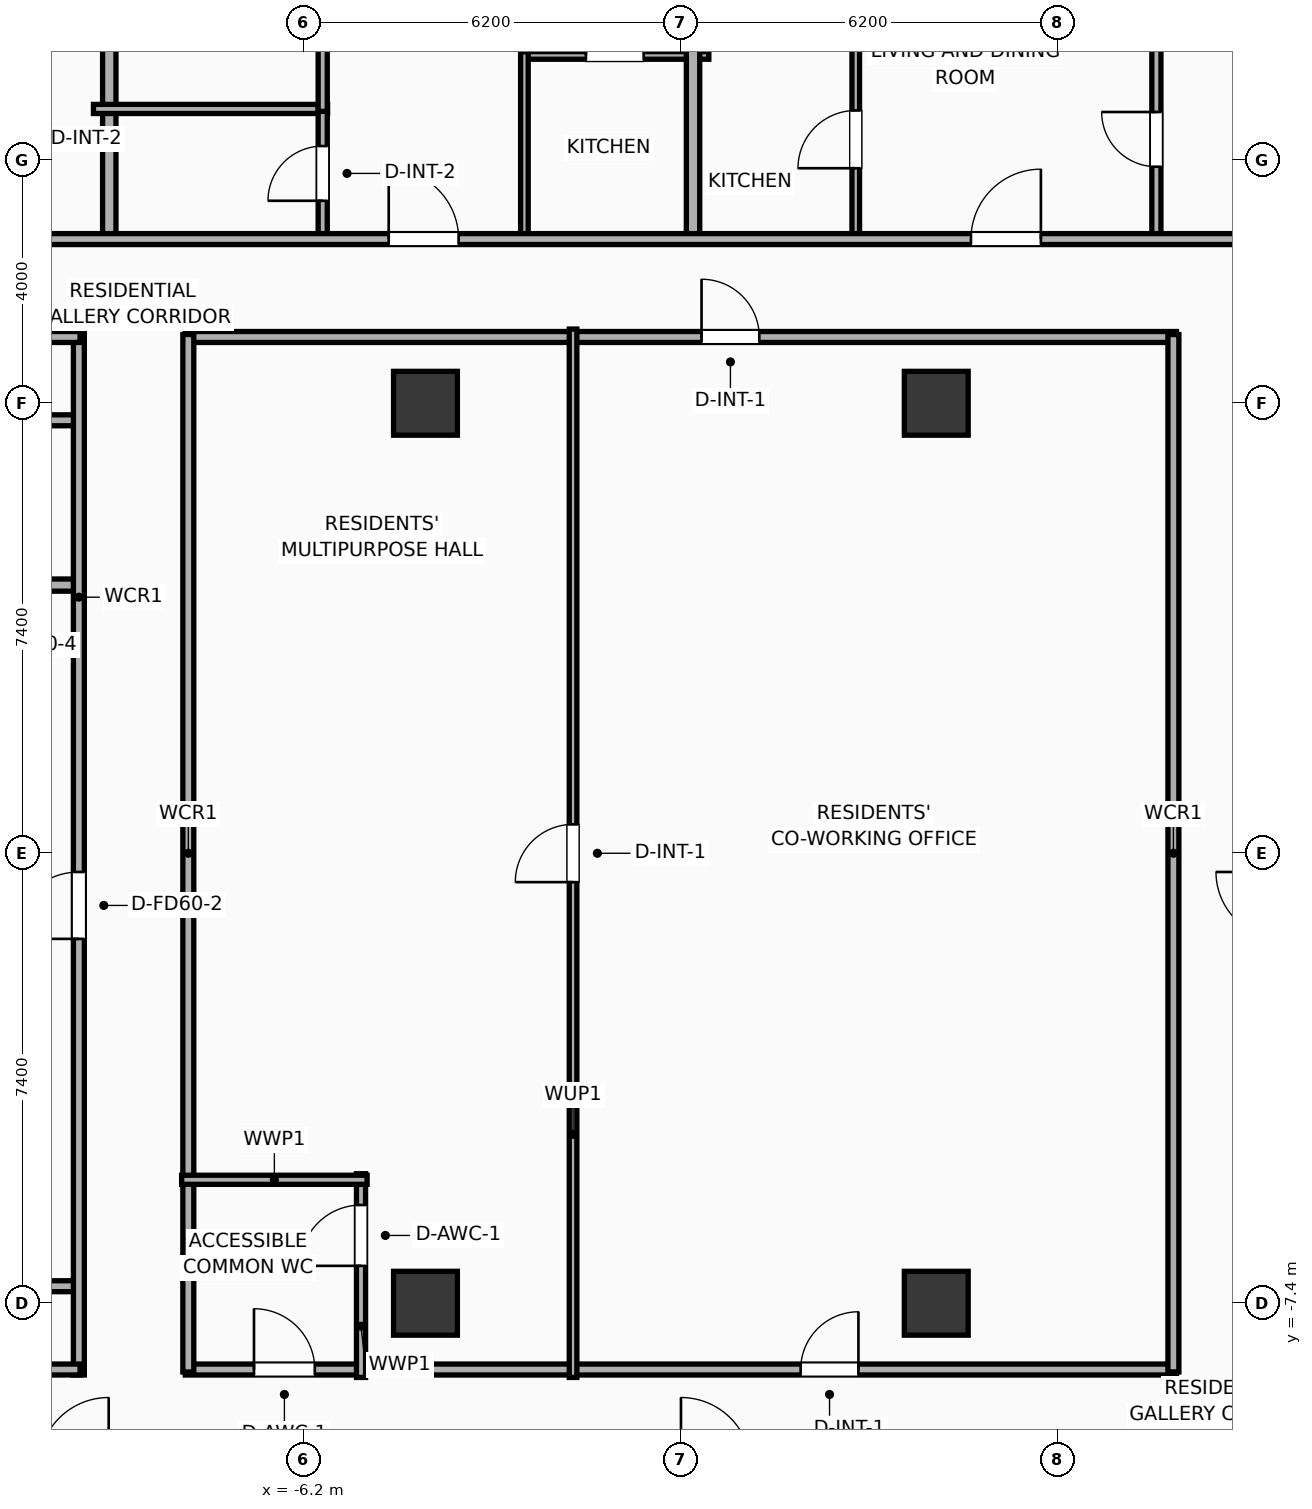
"""IFC4 building model, lengths in metres.
Left out: names, types, materials, properties, quantities, classifications, styles, units other than length and angle.
Written with IfcOpenShell. Run it as: python <this file> out.ifc"""

import sys

from ifc_helpers import new_model, si_unit, direction, frame, frame_2d, origin, origin_2d, place, context, subcontext, project, spatial, rectangle, extrude, element, fill, save


model = new_model("IFC4")
c1 = context("Model", 3, precision=1e-05, world=origin(), true_north=direction((0.0, 1.0)))
c2 = subcontext(c1, "Body", "Model", "MODEL_VIEW")
j1 = project(units=[si_unit("LENGTHUNIT", "METRE"), si_unit("PLANEANGLEUNIT", "RADIAN")], contexts=[c1])
p1 = place(None, origin())
s1 = spatial("IfcSite", under=j1, at=p1, CompositionType="ELEMENT")
p2 = place(p1, origin())
s2 = spatial("IfcBuilding", under=s1, at=p2, CompositionType="ELEMENT")
p3 = place(p2, frame((0.0, 0.0, 97.5)))
s3 = spatial("IfcBuildingStorey", under=s2, at=p3, CompositionType="ELEMENT", Elevation=97.5)
for number, where, z_axis, x_axis in (
    (1, (-4.2, -7.4, 0.0), (0.0, 0.0, 1.0), (1.0, 0.0, 0.0)),
    (2, (-4.2, 7.4, 0.0), (0.0, 0.0, 1.0), (1.0, 0.0, 0.0)),
    (3, (4.2, -7.4, 0.0), (0.0, 0.0, 1.0), (1.0, 0.0, 0.0)),
    (4, (4.2, 7.4, 0.0), (0.0, 0.0, 1.0), (1.0, 0.0, 0.0)),
):
    element("IfcColumn", number, at=place(p3, frame(where, z_axis=z_axis, x_axis=x_axis)), inside=s3, PredefinedType="COLUMN", context=c2, shape_type="SweptSolid", body=[
        extrude(rectangle(XDim=1.05, YDim=1.05, at=origin_2d()), origin(), (0.0, 0.0, 1.0), 3.9),
    ])
p4 = place(p3, frame((-12.15, 4.41, 0.0), z_axis=(0.0, 0.0, 1.0), x_axis=(1.0, 0.0, 0.0)))
e5 = element("IfcWall", 5, at=p4, inside=s3, PredefinedType="PARTITIONING", context=c2, shape_type="SweptSolid", body=[
    extrude(rectangle(XDim=2.27, YDim=0.2, at=frame_2d((1.135, 0.0))), origin(), (0.0, 0.0, 1.0), 3.65),
])
p5 = place(p4, frame((0.685, 0.0, 0.0)))
e6 = element("IfcOpeningElement", 6, at=p5, cuts=e5, PredefinedType="OPENING", context=c2, shape_type="SweptSolid", body=[
    extrude(rectangle(XDim=0.9, YDim=2.05, at=frame_2d((0.45, 1.025))), frame((0.0, 0.11, 0.0), z_axis=(0.0, -1.0, 0.0), x_axis=(1.0, 0.0, 0.0)), (0.0, 0.0, 1.0), 0.22),
])
for number, where, z_axis, x_axis in (
    (7, (-12.15, 7.12, 0.0), (0.0, 0.0, 1.0), (1.0, 0.0, 0.0)),
    (8, (-12.15, -7.12, 0.0), (0.0, 0.0, 1.0), (1.0, 0.0, 0.0)),
):
    element("IfcWall", number, at=place(p3, frame(where, z_axis=z_axis, x_axis=x_axis)), inside=s3, PredefinedType="PARTITIONING", context=c2, shape_type="SweptSolid", body=[
        extrude(rectangle(XDim=2.27, YDim=0.18, at=frame_2d((1.135, 0.0))), origin(), (0.0, 0.0, 1.0), 3.65),
    ])
p6 = place(p3, frame((-9.9, -8.58, 0.0), z_axis=(0.0, 0.0, 1.0), x_axis=(0.0, 1.0, 0.0)))
e9 = element("IfcWall", 9, at=p6, inside=s3, PredefinedType="PARTITIONING", context=c2, shape_type="SweptSolid", body=[
    extrude(rectangle(XDim=17.16, YDim=0.18, at=frame_2d((8.58, 0.0))), origin(), (0.0, 0.0, 1.0), 3.65),
])
p7 = place(p6, frame((7.172, 0.0, 0.0)))
e10 = element("IfcOpeningElement", 10, at=p7, cuts=e9, PredefinedType="OPENING", context=c2, shape_type="SweptSolid", body=[
    extrude(rectangle(XDim=1.1, YDim=2.05, at=frame_2d((0.55, 1.025))), frame((0.0, 0.1, 0.0), z_axis=(0.0, -1.0, 0.0), x_axis=(1.0, 0.0, 0.0)), (0.0, 0.0, 1.0), 0.2),
])
p8 = place(p3, frame((-29.21, 8.49, 0.0), z_axis=(0.0, 0.0, 1.0), x_axis=(1.0, 0.0, 0.0)))
e11 = element("IfcWall", 11, at=p8, inside=s3, PredefinedType="PARTITIONING", context=c2, shape_type="SweptSolid", body=[
    extrude(rectangle(XDim=19.33, YDim=0.18, at=frame_2d((9.665, 0.0))), origin(), (0.0, 0.0, 1.0), 3.65),
])
p9 = place(p8, frame((2.065, 0.0, 0.0)))
e12 = element("IfcOpeningElement", 12, at=p9, cuts=e11, PredefinedType="OPENING", context=c2, shape_type="SweptSolid", body=[
    extrude(rectangle(XDim=1.15, YDim=2.05, at=frame_2d((0.575, 1.025))), frame((0.0, 0.1, 0.0), z_axis=(0.0, -1.0, 0.0), x_axis=(1.0, 0.0, 0.0)), (0.0, 0.0, 1.0), 0.2),
])
p10 = place(p3, frame((-29.21, -8.49, 0.0), z_axis=(0.0, 0.0, 1.0), x_axis=(1.0, 0.0, 0.0)))
e13 = element("IfcWall", 13, at=p10, inside=s3, PredefinedType="PARTITIONING", context=c2, shape_type="SweptSolid", body=[
    extrude(rectangle(XDim=19.33, YDim=0.18, at=frame_2d((9.665, 0.0))), origin(), (0.0, 0.0, 1.0), 3.65),
])
p11 = place(p3, frame((-8.15, 8.49, 0.0), z_axis=(0.0, 0.0, 1.0), x_axis=(1.0, 0.0, 0.0)))
e14 = element("IfcWall", 14, at=p11, inside=s3, PredefinedType="PARTITIONING", context=c2, shape_type="SweptSolid", body=[
    extrude(rectangle(XDim=16.3, YDim=0.18, at=frame_2d((8.15, 0.0))), origin(), (0.0, 0.0, 1.0), 3.65),
])
p12 = place(p11, frame((8.49, 0.0, 0.0)))
e15 = element("IfcOpeningElement", 15, at=p12, cuts=e14, PredefinedType="OPENING", context=c2, shape_type="SweptSolid", body=[
    extrude(rectangle(XDim=0.95, YDim=2.05, at=frame_2d((0.475, 1.025))), frame((0.0, 0.1, 0.0), z_axis=(0.0, -1.0, 0.0), x_axis=(1.0, 0.0, 0.0)), (0.0, 0.0, 1.0), 0.2),
])
p13 = place(p3, frame((-8.15, -8.49, 0.0), z_axis=(0.0, 0.0, 1.0), x_axis=(1.0, 0.0, 0.0)))
e16 = element("IfcWall", 16, at=p13, inside=s3, PredefinedType="PARTITIONING", context=c2, shape_type="SweptSolid", body=[
    extrude(rectangle(XDim=16.3, YDim=0.18, at=frame_2d((8.15, 0.0))), origin(), (0.0, 0.0, 1.0), 3.65),
])
p14 = place(p13, frame((1.13, 0.0, 0.0)))
e17 = element("IfcOpeningElement", 17, at=p14, cuts=e16, PredefinedType="OPENING", context=c2, shape_type="SweptSolid", body=[
    extrude(rectangle(XDim=1.0, YDim=2.05, at=frame_2d((0.5, 1.025))), frame((0.0, 0.1, 0.0), z_axis=(0.0, -1.0, 0.0), x_axis=(1.0, 0.0, 0.0)), (0.0, 0.0, 1.0), 0.2),
])
p15 = place(p13, frame((10.12, 0.0, 0.0)))
e18 = element("IfcOpeningElement", 18, at=p15, cuts=e16, PredefinedType="OPENING", context=c2, shape_type="SweptSolid", body=[
    extrude(rectangle(XDim=0.95, YDim=2.05, at=frame_2d((0.475, 1.025))), frame((0.0, 0.1, 0.0), z_axis=(0.0, -1.0, 0.0), x_axis=(1.0, 0.0, 0.0)), (0.0, 0.0, 1.0), 0.2),
])
for number, where, z_axis, x_axis in (
    (19, (-8.1, -8.53, 0.0), (0.0, 0.0, 1.0), (0.0, 1.0, 0.0)),
    (20, (8.1, -8.53, 0.0), (0.0, 0.0, 1.0), (0.0, 1.0, 0.0)),
):
    element("IfcWall", number, at=place(p3, frame(where, z_axis=z_axis, x_axis=x_axis)), inside=s3, PredefinedType="PARTITIONING", context=c2, shape_type="SweptSolid", body=[
        extrude(rectangle(XDim=17.06, YDim=0.18, at=frame_2d((8.53, 0.0))), origin(), (0.0, 0.0, 1.0), 3.65),
    ])
p16 = place(p3, frame((-5.26, -8.62, 0.0), z_axis=(0.0, 0.0, 1.0), x_axis=(0.0, 1.0, 0.0)))
e21 = element("IfcWall", 21, at=p16, inside=s3, PredefinedType="PLUMBINGWALL", context=c2, shape_type="SweptSolid", body=[
    extrude(rectangle(XDim=3.35, YDim=0.15, at=frame_2d((1.675, 0.0))), origin(), (0.0, 0.0, 1.0), 3.65),
])
p17 = place(p16, frame((1.835, 0.0, 0.0)))
e22 = element("IfcOpeningElement", 22, at=p17, cuts=e21, PredefinedType="OPENING", context=c2, shape_type="SweptSolid", body=[
    extrude(rectangle(XDim=1.0, YDim=2.05, at=frame_2d((0.5, 1.025))), frame((0.0, 0.085, 0.0), z_axis=(0.0, -1.0, 0.0), x_axis=(1.0, 0.0, 0.0)), (0.0, 0.0, 1.0), 0.17),
])
p18 = place(p3, frame((-8.21, -5.37, 0.0), z_axis=(0.0, 0.0, 1.0), x_axis=(1.0, 0.0, 0.0)))
e23 = element("IfcWall", 23, at=p18, inside=s3, PredefinedType="PLUMBINGWALL", context=c2, shape_type="SweptSolid", body=[
    extrude(rectangle(XDim=3.05, YDim=0.15, at=frame_2d((1.525, 0.0))), origin(), (0.0, 0.0, 1.0), 3.65),
])
p19 = place(p3, frame((-1.773, -8.62, 0.0), z_axis=(0.0, 0.0, 1.0), x_axis=(0.0, 1.0, 0.0)))
e24 = element("IfcWall", 24, at=p19, inside=s3, PredefinedType="PARTITIONING", context=c2, shape_type="SweptSolid", body=[
    extrude(rectangle(XDim=17.24, YDim=0.125, at=frame_2d((8.62, 0.0))), origin(), (0.0, 0.0, 1.0), 3.65),
])
p20 = place(p19, frame((8.145, 0.0, 0.0)))
e25 = element("IfcOpeningElement", 25, at=p20, cuts=e24, PredefinedType="OPENING", context=c2, shape_type="SweptSolid", body=[
    extrude(rectangle(XDim=0.95, YDim=2.05, at=frame_2d((0.475, 1.025))), frame((0.0, 0.073, 0.0), z_axis=(0.0, -1.0, 0.0), x_axis=(1.0, 0.0, 0.0)), (0.0, 0.0, 1.0), 0.145),
])
p21 = place(p3, frame((-9.4, 10.02, 0.0), z_axis=(0.0, 0.0, 1.0), x_axis=(0.0, 1.0, 0.0)))
e26 = element("IfcWall", 26, at=p21, inside=s3, PredefinedType="PARTITIONING", context=c2, shape_type="SweptSolid", body=[
    extrude(rectangle(XDim=11.59, YDim=0.22, at=frame_2d((5.795, 0.0))), origin(), (0.0, 0.0, 1.0), 3.65),
])
p22 = place(p3, frame((-9.66, 12.24, 0.0), z_axis=(0.0, 0.0, 1.0), x_axis=(1.0, 0.0, 0.0)))
e27 = element("IfcWall", 27, at=p22, inside=s3, PredefinedType="PLUMBINGWALL", context=c2, shape_type="SweptSolid", body=[
    extrude(rectangle(XDim=3.85, YDim=0.15, at=frame_2d((1.925, 0.0))), origin(), (0.0, 0.0, 1.0), 3.65),
])
p23 = place(p3, frame((-5.89, 10.08, 0.0), z_axis=(0.0, 0.0, 1.0), x_axis=(0.0, 1.0, 0.0)))
e28 = element("IfcWall", 28, at=p23, inside=s3, PredefinedType="PLUMBINGWALL", context=c2, shape_type="SweptSolid", body=[
    extrude(rectangle(XDim=2.2, YDim=0.15, at=frame_2d((1.1, 0.0))), origin(), (0.0, 0.0, 1.0), 3.65),
])
p24 = place(p23, frame((0.65, 0.0, 0.0)))
e29 = element("IfcOpeningElement", 29, at=p24, cuts=e28, PredefinedType="OPENING", context=c2, shape_type="SweptSolid", body=[
    extrude(rectangle(XDim=0.9, YDim=2.05, at=frame_2d((0.45, 1.025))), frame((0.0, 0.085, 0.0), z_axis=(0.0, -1.0, 0.0), x_axis=(1.0, 0.0, 0.0)), (0.0, 0.0, 1.0), 0.17),
])
p25 = place(p3, frame((-5.89, 12.2, 0.0), z_axis=(0.0, 0.0, 1.0), x_axis=(0.0, 1.0, 0.0)))
e30 = element("IfcWall", 30, at=p25, inside=s3, PredefinedType="PLUMBINGWALL", context=c2, shape_type="SweptSolid", body=[
    extrude(rectangle(XDim=9.458, YDim=0.15, at=frame_2d((4.729, 0.0))), origin(), (0.0, 0.0, 1.0), 3.65),
])
p26 = place(p25, frame((1.063, 0.0, 0.0)))
e31 = element("IfcOpeningElement", 31, at=p26, cuts=e30, PredefinedType="OPENING", context=c2, shape_type="SweptSolid", body=[
    extrude(rectangle(XDim=0.9, YDim=2.05, at=frame_2d((0.45, 1.025))), frame((0.0, 0.085, 0.0), z_axis=(0.0, -1.0, 0.0), x_axis=(1.0, 0.0, 0.0)), (0.0, 0.0, 1.0), 0.17),
])
p27 = place(p3, frame((-2.633, 13.12, 0.0), z_axis=(0.0, 0.0, 1.0), x_axis=(1.0, 0.0, 0.0)))
e32 = element("IfcWall", 32, at=p27, inside=s3, PredefinedType="PARTITIONING", context=c2, shape_type="SweptSolid", body=[
    extrude(rectangle(XDim=3.093, YDim=0.125, at=frame_2d((1.546, 0.0))), origin(), (0.0, 0.0, 1.0), 3.65),
])
p28 = place(p27, frame((1.072, 0.0, 0.0)))
e33 = element("IfcOpeningElement", 33, at=p28, cuts=e32, PredefinedType="OPENING", context=c2, shape_type="SweptSolid", body=[
    extrude(rectangle(XDim=0.95, YDim=2.05, at=frame_2d((0.475, 1.025))), frame((0.0, 0.073, 0.0), z_axis=(0.0, -1.0, 0.0), x_axis=(1.0, 0.0, 0.0)), (0.0, 0.0, 1.0), 0.145),
])
p29 = place(p3, frame((-2.573, 10.08, 0.0), z_axis=(0.0, 0.0, 1.0), x_axis=(0.0, 1.0, 0.0)))
e34 = element("IfcWall", 34, at=p29, inside=s3, PredefinedType="PARTITIONING", context=c2, shape_type="SweptSolid", body=[
    extrude(rectangle(XDim=3.1, YDim=0.125, at=frame_2d((1.55, 0.0))), origin(), (0.0, 0.0, 1.0), 3.65),
])
p30 = place(p3, frame((0.2, 10.02, 0.0), z_axis=(0.0, 0.0, 1.0), x_axis=(0.0, 1.0, 0.0)))
e35 = element("IfcWall", 35, at=p30, inside=s3, PredefinedType="PARTITIONING", context=c2, shape_type="SweptSolid", body=[
    extrude(rectangle(XDim=11.59, YDim=0.22, at=frame_2d((5.795, 0.0))), origin(), (0.0, 0.0, 1.0), 3.65),
])
p31 = place(p3, frame((2.876, 10.08, 0.0), z_axis=(0.0, 0.0, 1.0), x_axis=(0.0, 1.0, 0.0)))
e36 = element("IfcWall", 36, at=p31, inside=s3, PredefinedType="PARTITIONING", context=c2, shape_type="SweptSolid", body=[
    extrude(rectangle(XDim=3.32, YDim=0.125, at=frame_2d((1.66, 0.0))), origin(), (0.0, 0.0, 1.0), 3.65),
])
p32 = place(p31, frame((1.185, 0.0, 0.0)))
e37 = element("IfcOpeningElement", 37, at=p32, cuts=e36, PredefinedType="OPENING", context=c2, shape_type="SweptSolid", body=[
    extrude(rectangle(XDim=0.95, YDim=2.05, at=frame_2d((0.475, 1.025))), frame((0.0, 0.073, 0.0), z_axis=(0.0, -1.0, 0.0), x_axis=(1.0, 0.0, 0.0)), (0.0, 0.0, 1.0), 0.145),
])
p33 = place(p3, frame((7.82, 10.08, 0.0), z_axis=(0.0, 0.0, 1.0), x_axis=(0.0, 1.0, 0.0)))
e38 = element("IfcWall", 38, at=p33, inside=s3, PredefinedType="PLUMBINGWALL", context=c2, shape_type="SweptSolid", body=[
    extrude(rectangle(XDim=3.32, YDim=0.15, at=frame_2d((1.66, 0.0))), origin(), (0.0, 0.0, 1.0), 3.65),
])
p34 = place(p33, frame((1.21, 0.0, 0.0)))
e39 = element("IfcOpeningElement", 39, at=p34, cuts=e38, PredefinedType="OPENING", context=c2, shape_type="SweptSolid", body=[
    extrude(rectangle(XDim=0.9, YDim=2.05, at=frame_2d((0.45, 1.025))), frame((0.0, 0.085, 0.0), z_axis=(0.0, -1.0, 0.0), x_axis=(1.0, 0.0, 0.0)), (0.0, 0.0, 1.0), 0.17),
])
p35 = place(p3, frame((-29.21, 10.1, 0.0), z_axis=(0.0, 0.0, 1.0), x_axis=(1.0, 0.0, 0.0)))
e40 = element("IfcWall", 40, at=p35, inside=s3, PredefinedType="PARTITIONING", context=c2, shape_type="SweptSolid", body=[
    extrude(rectangle(XDim=62.42, YDim=0.18, at=frame_2d((31.21, 0.0))), origin(), (0.0, 0.0, 1.0), 3.65),
])
p36 = place(p35, frame((4.906, 0.0, 0.0)))
e41 = element("IfcOpeningElement", 41, at=p36, cuts=e40, PredefinedType="OPENING", context=c2, shape_type="SweptSolid", body=[
    extrude(rectangle(XDim=1.15, YDim=2.05, at=frame_2d((0.575, 1.025))), frame((0.0, 0.1, 0.0), z_axis=(0.0, -1.0, 0.0), x_axis=(1.0, 0.0, 0.0)), (0.0, 0.0, 1.0), 0.2),
])
p37 = place(p35, frame((14.812, 0.0, 0.0)))
e42 = element("IfcOpeningElement", 42, at=p37, cuts=e40, PredefinedType="OPENING", context=c2, shape_type="SweptSolid", body=[
    extrude(rectangle(XDim=1.15, YDim=2.05, at=frame_2d((0.575, 1.025))), frame((0.0, 0.1, 0.0), z_axis=(0.0, -1.0, 0.0), x_axis=(1.0, 0.0, 0.0)), (0.0, 0.0, 1.0), 0.2),
])
p38 = place(p35, frame((24.406, 0.0, 0.0)))
e43 = element("IfcOpeningElement", 43, at=p38, cuts=e40, PredefinedType="OPENING", context=c2, shape_type="SweptSolid", body=[
    extrude(rectangle(XDim=1.15, YDim=2.05, at=frame_2d((0.575, 1.025))), frame((0.0, 0.1, 0.0), z_axis=(0.0, -1.0, 0.0), x_axis=(1.0, 0.0, 0.0)), (0.0, 0.0, 1.0), 0.2),
])
p39 = place(p35, frame((33.981, 0.0, 0.0)))
e44 = element("IfcOpeningElement", 44, at=p39, cuts=e40, PredefinedType="OPENING", context=c2, shape_type="SweptSolid", body=[
    extrude(rectangle(XDim=1.15, YDim=2.05, at=frame_2d((0.575, 1.025))), frame((0.0, 0.1, 0.0), z_axis=(0.0, -1.0, 0.0), x_axis=(1.0, 0.0, 0.0)), (0.0, 0.0, 1.0), 0.2),
])
p40 = place(p35, frame((43.138, 0.0, 0.0)))
e45 = element("IfcOpeningElement", 45, at=p40, cuts=e40, PredefinedType="OPENING", context=c2, shape_type="SweptSolid", body=[
    extrude(rectangle(XDim=1.15, YDim=2.05, at=frame_2d((0.575, 1.025))), frame((0.0, 0.1, 0.0), z_axis=(0.0, -1.0, 0.0), x_axis=(1.0, 0.0, 0.0)), (0.0, 0.0, 1.0), 0.2),
])
p41 = place(p35, frame((51.777, 0.0, 0.0)))
e46 = element("IfcOpeningElement", 46, at=p41, cuts=e40, PredefinedType="OPENING", context=c2, shape_type="SweptSolid", body=[
    extrude(rectangle(XDim=0.9, YDim=2.05, at=frame_2d((0.45, 1.025))), frame((0.0, 0.1, 0.0), z_axis=(0.0, -1.0, 0.0), x_axis=(1.0, 0.0, 0.0)), (0.0, 0.0, 1.0), 0.2),
])
p42 = place(p35, frame((58.718, 0.0, 0.0)))
e47 = element("IfcOpeningElement", 47, at=p42, cuts=e40, PredefinedType="OPENING", context=c2, shape_type="SweptSolid", body=[
    extrude(rectangle(XDim=0.9, YDim=2.05, at=frame_2d((0.45, 1.025))), frame((0.0, 0.1, 0.0), z_axis=(0.0, -1.0, 0.0), x_axis=(1.0, 0.0, 0.0)), (0.0, 0.0, 1.0), 0.2),
])
p43 = place(p7, origin())
e48 = element("IfcDoor", 48, at=p43, inside=s3, OperationType="SINGLE_SWING_LEFT", PredefinedType="DOOR", context=c2, shape_type="SweptSolid", body=[
    extrude(rectangle(XDim=1.1, YDim=2.05, at=frame_2d((0.55, 1.025))), frame((0.0, 0.025, 0.0), z_axis=(0.0, -1.0, 0.0), x_axis=(1.0, 0.0, 0.0)), (0.0, 0.0, 1.0), 0.05),
])
fill(e10, e48)
p44 = place(p12, origin())
e49 = element("IfcDoor", 49, at=p44, inside=s3, OperationType="SINGLE_SWING_LEFT", PredefinedType="DOOR", context=c2, shape_type="SweptSolid", body=[
    extrude(rectangle(XDim=0.95, YDim=2.05, at=frame_2d((0.475, 1.025))), frame((0.0, 0.025, 0.0), z_axis=(0.0, -1.0, 0.0), x_axis=(1.0, 0.0, 0.0)), (0.0, 0.0, 1.0), 0.05),
])
fill(e15, e49)
p45 = place(p14, origin())
e50 = element("IfcDoor", 50, at=p45, inside=s3, OperationType="SINGLE_SWING_LEFT", PredefinedType="DOOR", context=c2, shape_type="SweptSolid", body=[
    extrude(rectangle(XDim=1.0, YDim=2.05, at=frame_2d((0.5, 1.025))), frame((0.0, 0.025, 0.0), z_axis=(0.0, -1.0, 0.0), x_axis=(1.0, 0.0, 0.0)), (0.0, 0.0, 1.0), 0.05),
])
fill(e17, e50)
p46 = place(p15, origin())
e51 = element("IfcDoor", 51, at=p46, inside=s3, OperationType="SINGLE_SWING_RIGHT", PredefinedType="DOOR", context=c2, shape_type="SweptSolid", body=[
    extrude(rectangle(XDim=0.95, YDim=2.05, at=frame_2d((0.475, 1.025))), frame((0.0, 0.025, 0.0), z_axis=(0.0, -1.0, 0.0), x_axis=(1.0, 0.0, 0.0)), (0.0, 0.0, 1.0), 0.05),
])
fill(e18, e51)
p47 = place(p17, origin())
e52 = element("IfcDoor", 52, at=p47, inside=s3, OperationType="SINGLE_SWING_LEFT", PredefinedType="DOOR", context=c2, shape_type="SweptSolid", body=[
    extrude(rectangle(XDim=1.0, YDim=2.05, at=frame_2d((0.5, 1.025))), frame((0.0, 0.025, 0.0), z_axis=(0.0, -1.0, 0.0), x_axis=(1.0, 0.0, 0.0)), (0.0, 0.0, 1.0), 0.05),
])
fill(e22, e52)
p48 = place(p20, origin())
e53 = element("IfcDoor", 53, at=p48, inside=s3, OperationType="SINGLE_SWING_LEFT", PredefinedType="DOOR", context=c2, shape_type="SweptSolid", body=[
    extrude(rectangle(XDim=0.95, YDim=2.05, at=frame_2d((0.475, 1.025))), frame((0.0, 0.025, 0.0), z_axis=(0.0, -1.0, 0.0), x_axis=(1.0, 0.0, 0.0)), (0.0, 0.0, 1.0), 0.05),
])
fill(e25, e53)
p49 = place(p24, origin())
e54 = element("IfcDoor", 54, at=p49, inside=s3, OperationType="SINGLE_SWING_LEFT", PredefinedType="DOOR", context=c2, shape_type="SweptSolid", body=[
    extrude(rectangle(XDim=0.9, YDim=2.05, at=frame_2d((0.45, 1.025))), frame((0.0, 0.025, 0.0), z_axis=(0.0, -1.0, 0.0), x_axis=(1.0, 0.0, 0.0)), (0.0, 0.0, 1.0), 0.05),
])
fill(e29, e54)
p50 = place(p28, origin())
e55 = element("IfcDoor", 55, at=p50, inside=s3, OperationType="SINGLE_SWING_LEFT", PredefinedType="DOOR", context=c2, shape_type="SweptSolid", body=[
    extrude(rectangle(XDim=0.95, YDim=2.05, at=frame_2d((0.475, 1.025))), frame((0.0, 0.025, 0.0), z_axis=(0.0, -1.0, 0.0), x_axis=(1.0, 0.0, 0.0)), (0.0, 0.0, 1.0), 0.05),
])
fill(e33, e55)
p51 = place(p32, origin())
e56 = element("IfcDoor", 56, at=p51, inside=s3, OperationType="SINGLE_SWING_LEFT", PredefinedType="DOOR", context=c2, shape_type="SweptSolid", body=[
    extrude(rectangle(XDim=0.95, YDim=2.05, at=frame_2d((0.475, 1.025))), frame((0.0, 0.025, 0.0), z_axis=(0.0, -1.0, 0.0), x_axis=(1.0, 0.0, 0.0)), (0.0, 0.0, 1.0), 0.05),
])
fill(e37, e56)
p52 = place(p34, origin())
e57 = element("IfcDoor", 57, at=p52, inside=s3, OperationType="SINGLE_SWING_RIGHT", PredefinedType="DOOR", context=c2, shape_type="SweptSolid", body=[
    extrude(rectangle(XDim=0.9, YDim=2.05, at=frame_2d((0.45, 1.025))), frame((0.0, 0.025, 0.0), z_axis=(0.0, -1.0, 0.0), x_axis=(1.0, 0.0, 0.0)), (0.0, 0.0, 1.0), 0.05),
])
fill(e39, e57)
p53 = place(p38, origin())
e58 = element("IfcDoor", 58, at=p53, inside=s3, OperationType="SINGLE_SWING_LEFT", PredefinedType="DOOR", context=c2, shape_type="SweptSolid", body=[
    extrude(rectangle(XDim=1.15, YDim=2.05, at=frame_2d((0.575, 1.025))), frame((0.0, 0.025, 0.0), z_axis=(0.0, -1.0, 0.0), x_axis=(1.0, 0.0, 0.0)), (0.0, 0.0, 1.0), 0.05),
])
fill(e43, e58)
p54 = place(p39, origin())
e59 = element("IfcDoor", 59, at=p54, inside=s3, OperationType="SINGLE_SWING_RIGHT", PredefinedType="DOOR", context=c2, shape_type="SweptSolid", body=[
    extrude(rectangle(XDim=1.15, YDim=2.05, at=frame_2d((0.575, 1.025))), frame((0.0, 0.025, 0.0), z_axis=(0.0, -1.0, 0.0), x_axis=(1.0, 0.0, 0.0)), (0.0, 0.0, 1.0), 0.05),
])
fill(e44, e59)
save(model, sys.argv[1])
